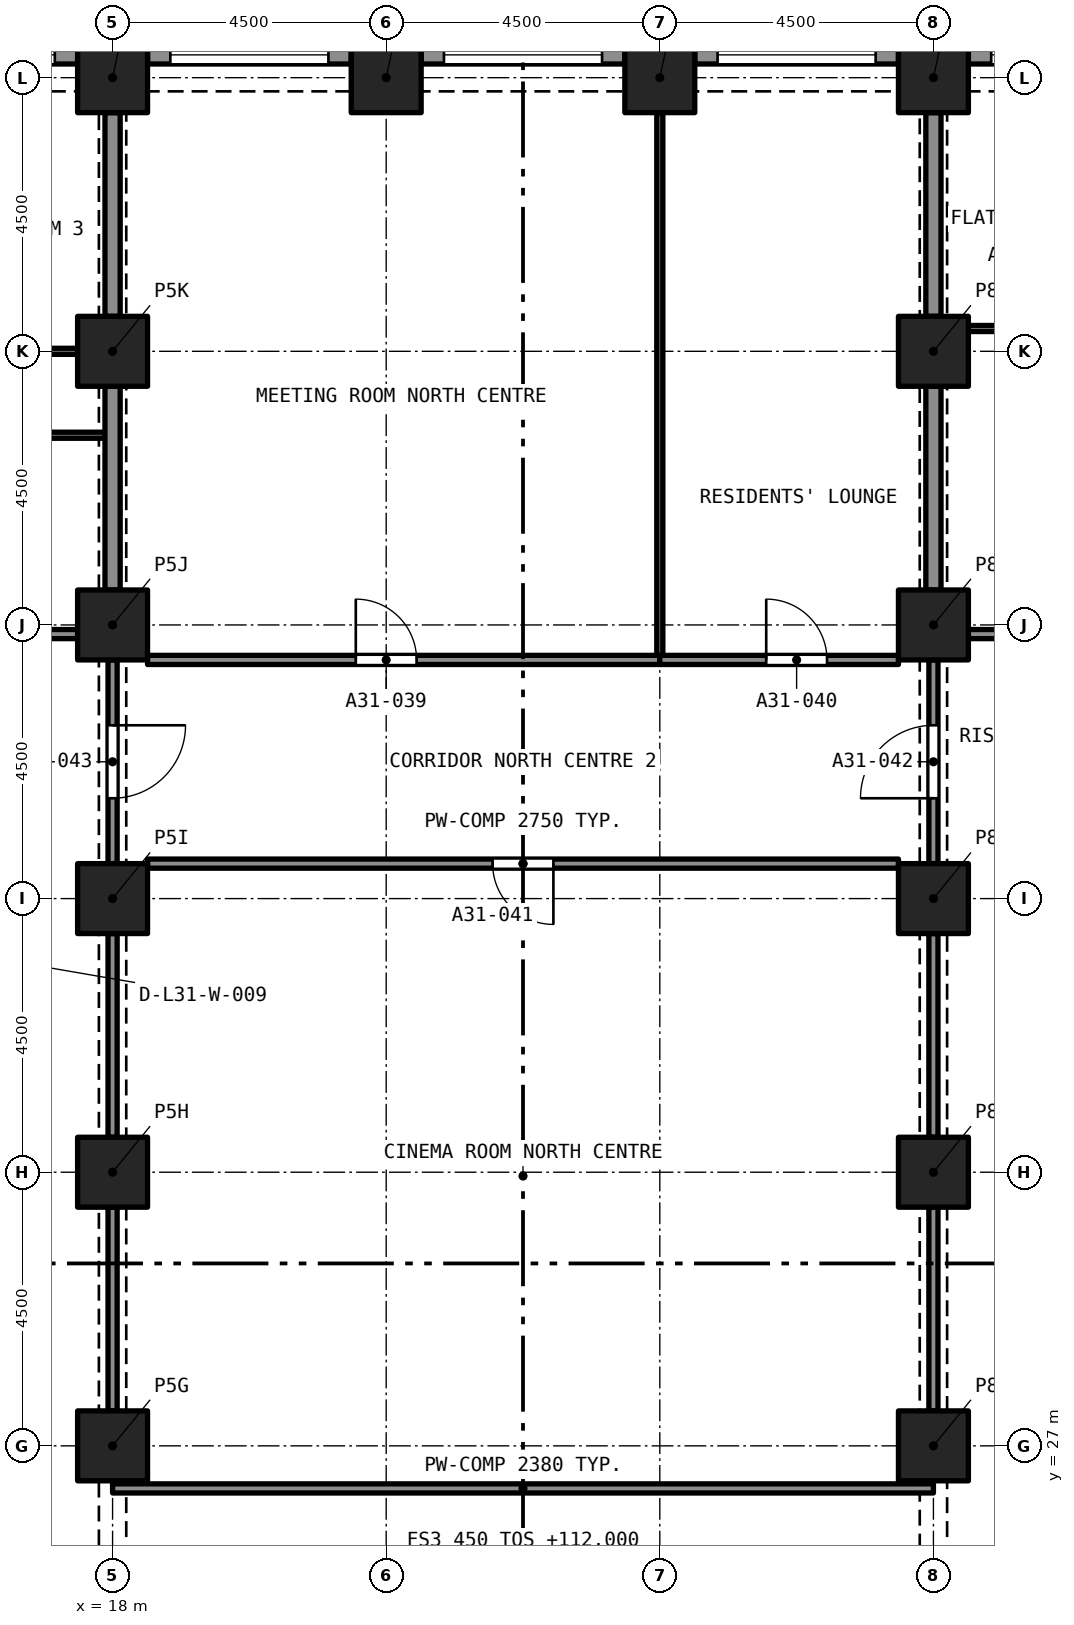
"""IFC4 building model, lengths in metres.
Left out: names, types, materials, properties, quantities, classifications, styles, units other than length and angle.
Written with IfcOpenShell. Run it as: python <this file> out.ifc"""

import sys

from ifc_helpers import new_model, si_unit, direction, frame, frame_2d, origin, origin_2d, place, context, subcontext, project, spatial, rectangle, extrude, element, fill, save


model = new_model("IFC4")
c1 = context("Model", 3, precision=1e-05, world=origin(), true_north=direction((0.0, 1.0)))
c2 = subcontext(c1, "Body", "Model", "MODEL_VIEW")
j1 = project(units=[si_unit("LENGTHUNIT", "METRE"), si_unit("PLANEANGLEUNIT", "RADIAN")], contexts=[c1])
p1 = place(None, origin())
s1 = spatial("IfcSite", under=j1, at=p1, CompositionType="ELEMENT")
p2 = place(p1, origin())
s2 = spatial("IfcBuilding", under=s1, at=p2, CompositionType="ELEMENT")
p3 = place(p2, frame((0.0, 0.0, 112.0)))
s3 = spatial("IfcBuildingStorey", under=s2, at=p3, CompositionType="ELEMENT", Elevation=112.0)
for number, where, z_axis, x_axis in (
    (1, (18.0, 27.0, 0.0), (0.0, 0.0, 1.0), (1.0, 0.0, 0.0)),
    (2, (31.5, 27.0, 0.0), (0.0, 0.0, 1.0), (1.0, 0.0, 0.0)),
    (3, (18.0, 31.5, 0.0), (0.0, 0.0, 1.0), (1.0, 0.0, 0.0)),
    (4, (31.5, 31.5, 0.0), (0.0, 0.0, 1.0), (1.0, 0.0, 0.0)),
    (5, (18.0, 36.0, 0.0), (0.0, 0.0, 1.0), (1.0, 0.0, 0.0)),
    (6, (31.5, 36.0, 0.0), (0.0, 0.0, 1.0), (1.0, 0.0, 0.0)),
    (7, (18.0, 40.5, 0.0), (0.0, 0.0, 1.0), (1.0, 0.0, 0.0)),
    (8, (31.5, 40.5, 0.0), (0.0, 0.0, 1.0), (1.0, 0.0, 0.0)),
    (9, (18.0, 45.0, 0.0), (0.0, 0.0, 1.0), (1.0, 0.0, 0.0)),
    (10, (31.5, 45.0, 0.0), (0.0, 0.0, 1.0), (1.0, 0.0, 0.0)),
    (11, (18.0, 49.5, 0.0), (0.0, 0.0, 1.0), (1.0, 0.0, 0.0)),
    (12, (22.5, 49.5, 0.0), (0.0, 0.0, 1.0), (1.0, 0.0, 0.0)),
    (13, (27.0, 49.5, 0.0), (0.0, 0.0, 1.0), (1.0, 0.0, 0.0)),
    (14, (31.5, 49.5, 0.0), (0.0, 0.0, 1.0), (1.0, 0.0, 0.0)),
):
    element("IfcColumn", number, at=place(p3, frame(where, z_axis=z_axis, x_axis=x_axis)), inside=s3, PredefinedType="COLUMN", context=c2, shape_type="SweptSolid", body=[
        extrude(rectangle(XDim=1.15, YDim=1.15, at=origin_2d()), origin(), (0.0, 0.0, 1.0), 3.2),
    ])
p4 = place(p3, frame((32.075, 49.875, 0.0), z_axis=(0.0, 0.0, 1.0), x_axis=(1.0, 0.0, 0.0)))
e15 = element("IfcWall", 15, at=p4, inside=s3, PredefinedType="SOLIDWALL", context=c2, shape_type="SweptSolid", body=[
    extrude(rectangle(XDim=3.35, YDim=0.3, at=frame_2d((1.675, 0.0))), origin(), (0.0, 0.0, 1.0), 3.2),
])
p5 = place(p4, frame((0.375, 0.0, 0.45)))
e16 = element("IfcOpeningElement", 16, at=p5, cuts=e15, PredefinedType="OPENING", context=c2, shape_type="SweptSolid", body=[
    extrude(rectangle(XDim=2.6, YDim=1.95, at=frame_2d((1.3, 0.975))), frame((0.0, 0.16, 0.0), z_axis=(0.0, -1.0, 0.0), x_axis=(1.0, 0.0, 0.0)), (0.0, 0.0, 1.0), 0.32),
])
p6 = place(p3, frame((27.575, 49.875, 0.0), z_axis=(0.0, 0.0, 1.0), x_axis=(1.0, 0.0, 0.0)))
e17 = element("IfcWall", 17, at=p6, inside=s3, PredefinedType="SOLIDWALL", context=c2, shape_type="SweptSolid", body=[
    extrude(rectangle(XDim=3.35, YDim=0.3, at=frame_2d((1.675, 0.0))), origin(), (0.0, 0.0, 1.0), 3.2),
])
p7 = place(p6, frame((0.375, 0.0, 0.45)))
e18 = element("IfcOpeningElement", 18, at=p7, cuts=e17, PredefinedType="OPENING", context=c2, shape_type="SweptSolid", body=[
    extrude(rectangle(XDim=2.6, YDim=1.95, at=frame_2d((1.3, 0.975))), frame((0.0, 0.16, 0.0), z_axis=(0.0, -1.0, 0.0), x_axis=(1.0, 0.0, 0.0)), (0.0, 0.0, 1.0), 0.32),
])
p8 = place(p3, frame((23.075, 49.875, 0.0), z_axis=(0.0, 0.0, 1.0), x_axis=(1.0, 0.0, 0.0)))
e19 = element("IfcWall", 19, at=p8, inside=s3, PredefinedType="SOLIDWALL", context=c2, shape_type="SweptSolid", body=[
    extrude(rectangle(XDim=3.35, YDim=0.3, at=frame_2d((1.675, 0.0))), origin(), (0.0, 0.0, 1.0), 3.2),
])
p9 = place(p8, frame((0.375, 0.0, 0.45)))
e20 = element("IfcOpeningElement", 20, at=p9, cuts=e19, PredefinedType="OPENING", context=c2, shape_type="SweptSolid", body=[
    extrude(rectangle(XDim=2.6, YDim=1.95, at=frame_2d((1.3, 0.975))), frame((0.0, 0.16, 0.0), z_axis=(0.0, -1.0, 0.0), x_axis=(1.0, 0.0, 0.0)), (0.0, 0.0, 1.0), 0.32),
])
p10 = place(p3, frame((18.575, 49.875, 0.0), z_axis=(0.0, 0.0, 1.0), x_axis=(1.0, 0.0, 0.0)))
e21 = element("IfcWall", 21, at=p10, inside=s3, PredefinedType="SOLIDWALL", context=c2, shape_type="SweptSolid", body=[
    extrude(rectangle(XDim=3.35, YDim=0.3, at=frame_2d((1.675, 0.0))), origin(), (0.0, 0.0, 1.0), 3.2),
])
p11 = place(p10, frame((0.375, 0.0, 0.45)))
e22 = element("IfcOpeningElement", 22, at=p11, cuts=e21, PredefinedType="OPENING", context=c2, shape_type="SweptSolid", body=[
    extrude(rectangle(XDim=2.6, YDim=1.95, at=frame_2d((1.3, 0.975))), frame((0.0, 0.16, 0.0), z_axis=(0.0, -1.0, 0.0), x_axis=(1.0, 0.0, 0.0)), (0.0, 0.0, 1.0), 0.32),
])
p12 = place(p3, frame((14.075, 49.875, 0.0), z_axis=(0.0, 0.0, 1.0), x_axis=(1.0, 0.0, 0.0)))
e23 = element("IfcWall", 23, at=p12, inside=s3, PredefinedType="SOLIDWALL", context=c2, shape_type="SweptSolid", body=[
    extrude(rectangle(XDim=3.35, YDim=0.3, at=frame_2d((1.675, 0.0))), origin(), (0.0, 0.0, 1.0), 3.2),
])
p13 = place(p12, frame((0.375, 0.0, 0.45)))
e24 = element("IfcOpeningElement", 24, at=p13, cuts=e23, PredefinedType="OPENING", context=c2, shape_type="SweptSolid", body=[
    extrude(rectangle(XDim=2.6, YDim=1.95, at=frame_2d((1.3, 0.975))), frame((0.0, 0.16, 0.0), z_axis=(0.0, -1.0, 0.0), x_axis=(1.0, 0.0, 0.0)), (0.0, 0.0, 1.0), 0.32),
])
p14 = place(p3, frame((13.5, 45.0, 0.0), z_axis=(0.0, 0.0, 1.0), x_axis=(1.0, 0.0, 0.0)))
e25 = element("IfcWall", 25, at=p14, inside=s3, PredefinedType="PARTITIONING", context=c2, shape_type="SweptSolid", body=[
    extrude(rectangle(XDim=3.925, YDim=0.1, at=frame_2d((1.962, 0.0))), origin(), (0.0, 0.0, 1.0), 2.9),
])
p15 = place(p14, frame((1.8, 0.0, 0.0)))
e26 = element("IfcOpeningElement", 26, at=p15, cuts=e25, PredefinedType="OPENING", context=c2, shape_type="SweptSolid", body=[
    extrude(rectangle(XDim=0.9, YDim=2.1, at=frame_2d((0.45, 1.05))), frame((0.0, 0.06, 0.0), z_axis=(0.0, -1.0, 0.0), x_axis=(1.0, 0.0, 0.0)), (0.0, 0.0, 1.0), 0.12),
])
p16 = place(p3, frame((18.0, 45.575, 0.0), z_axis=(0.0, 0.0, 1.0), x_axis=(0.0, 1.0, 0.0)))
e27 = element("IfcWall", 27, at=p16, inside=s3, PredefinedType="PARTITIONING", context=c2, shape_type="SweptSolid", body=[
    extrude(rectangle(XDim=3.35, YDim=0.25, at=frame_2d((1.675, 0.0))), origin(), (0.0, 0.0, 1.0), 2.38),
])
p17 = place(p3, frame((17.875, 43.62, 0.0), z_axis=(0.0, 0.0, 1.0), x_axis=(-1.0, 0.0, 0.0)))
e28 = element("IfcWall", 28, at=p17, inside=s3, PredefinedType="PARTITIONING", context=c2, shape_type="SweptSolid", body=[
    extrude(rectangle(XDim=6.064, YDim=0.1, at=frame_2d((3.032, 0.0))), origin(), (0.0, 0.0, 1.0), 2.9),
])
p18 = place(p17, frame((2.52, 0.0, 0.0)))
e29 = element("IfcOpeningElement", 29, at=p18, cuts=e28, PredefinedType="OPENING", context=c2, shape_type="SweptSolid", body=[
    extrude(rectangle(XDim=0.9, YDim=2.1, at=frame_2d((0.45, 1.05))), frame((0.0, 0.06, 0.0), z_axis=(0.0, -1.0, 0.0), x_axis=(1.0, 0.0, 0.0)), (0.0, 0.0, 1.0), 0.12),
])
p19 = place(p3, frame((18.0, 41.075, 0.0), z_axis=(0.0, 0.0, 1.0), x_axis=(0.0, 1.0, 0.0)))
e30 = element("IfcWall", 30, at=p19, inside=s3, PredefinedType="PARTITIONING", context=c2, shape_type="SweptSolid", body=[
    extrude(rectangle(XDim=3.35, YDim=0.25, at=frame_2d((1.675, 0.0))), origin(), (0.0, 0.0, 1.0), 2.38),
])
p20 = place(p3, frame((13.35, 40.35, 0.0), z_axis=(0.0, 0.0, 1.0), x_axis=(1.0, 0.0, 0.0)))
e31 = element("IfcWall", 31, at=p20, inside=s3, PredefinedType="PARTITIONING", context=c2, shape_type="SweptSolid", body=[
    extrude(rectangle(XDim=4.075, YDim=0.15, at=frame_2d((2.038, 0.0))), origin(), (0.0, 0.0, 1.0), 2.9),
])
p21 = place(p3, frame((32.075, 45.375, 0.0), z_axis=(0.0, 0.0, 1.0), x_axis=(1.0, 0.0, 0.0)))
e32 = element("IfcWall", 32, at=p21, inside=s3, PredefinedType="PARTITIONING", context=c2, shape_type="SweptSolid", body=[
    extrude(rectangle(XDim=3.925, YDim=0.1, at=frame_2d((1.962, 0.0))), origin(), (0.0, 0.0, 1.0), 2.9),
])
p22 = place(p21, frame((1.175, 0.0, 0.0)))
e33 = element("IfcOpeningElement", 33, at=p22, cuts=e32, PredefinedType="OPENING", context=c2, shape_type="SweptSolid", body=[
    extrude(rectangle(XDim=1.0, YDim=2.1, at=frame_2d((0.5, 1.05))), frame((0.0, 0.06, 0.0), z_axis=(0.0, -1.0, 0.0), x_axis=(1.0, 0.0, 0.0)), (0.0, 0.0, 1.0), 0.12),
])
p23 = place(p3, frame((31.5, 41.075, 0.0), z_axis=(0.0, 0.0, 1.0), x_axis=(0.0, 1.0, 0.0)))
e34 = element("IfcWall", 34, at=p23, inside=s3, PredefinedType="PARTITIONING", context=c2, shape_type="SweptSolid", body=[
    extrude(rectangle(XDim=3.35, YDim=0.25, at=frame_2d((1.675, 0.0))), origin(), (0.0, 0.0, 1.0), 2.38),
])
p24 = place(p3, frame((32.075, 40.35, 0.0), z_axis=(0.0, 0.0, 1.0), x_axis=(1.0, 0.0, 0.0)))
e35 = element("IfcWall", 35, at=p24, inside=s3, PredefinedType="PARTITIONING", context=c2, shape_type="SweptSolid", body=[
    extrude(rectangle(XDim=2.425, YDim=0.15, at=frame_2d((1.212, 0.0))), origin(), (0.0, 0.0, 1.0), 2.9),
])
p25 = place(p24, frame((1.175, 0.0, 0.0)))
e36 = element("IfcOpeningElement", 36, at=p25, cuts=e35, PredefinedType="OPENING", context=c2, shape_type="SweptSolid", body=[
    extrude(rectangle(XDim=1.0, YDim=2.1, at=frame_2d((0.5, 1.05))), frame((0.0, 0.085, 0.0), z_axis=(0.0, -1.0, 0.0), x_axis=(1.0, 0.0, 0.0)), (0.0, 0.0, 1.0), 0.17),
])
p26 = place(p3, frame((31.5, 45.575, 0.0), z_axis=(0.0, 0.0, 1.0), x_axis=(0.0, 1.0, 0.0)))
e37 = element("IfcWall", 37, at=p26, inside=s3, PredefinedType="PARTITIONING", context=c2, shape_type="SweptSolid", body=[
    extrude(rectangle(XDim=3.35, YDim=0.25, at=frame_2d((1.675, 0.0))), origin(), (0.0, 0.0, 1.0), 2.38),
])
p27 = place(p3, frame((18.575, 39.925, 0.0), z_axis=(0.0, 0.0, 1.0), x_axis=(1.0, 0.0, 0.0)))
e38 = element("IfcWall", 38, at=p27, inside=s3, PredefinedType="PARTITIONING", context=c2, shape_type="SweptSolid", body=[
    extrude(rectangle(XDim=8.425, YDim=0.15, at=frame_2d((4.212, 0.0))), origin(), (0.0, 0.0, 1.0), 2.75),
])
p28 = place(p27, frame((3.425, 0.0, 0.0)))
e39 = element("IfcOpeningElement", 39, at=p28, cuts=e38, PredefinedType="OPENING", context=c2, shape_type="SweptSolid", body=[
    extrude(rectangle(XDim=1.0, YDim=2.1, at=frame_2d((0.5, 1.05))), frame((0.0, 0.085, 0.0), z_axis=(0.0, -1.0, 0.0), x_axis=(1.0, 0.0, 0.0)), (0.0, 0.0, 1.0), 0.17),
])
p29 = place(p3, frame((27.0, 39.925, 0.0), z_axis=(0.0, 0.0, 1.0), x_axis=(1.0, 0.0, 0.0)))
e40 = element("IfcWall", 40, at=p29, inside=s3, PredefinedType="PARTITIONING", context=c2, shape_type="SweptSolid", body=[
    extrude(rectangle(XDim=3.925, YDim=0.15, at=frame_2d((1.962, 0.0))), origin(), (0.0, 0.0, 1.0), 2.75),
])
p30 = place(p29, frame((1.75, 0.0, 0.0)))
e41 = element("IfcOpeningElement", 41, at=p30, cuts=e40, PredefinedType="OPENING", context=c2, shape_type="SweptSolid", body=[
    extrude(rectangle(XDim=1.0, YDim=2.1, at=frame_2d((0.5, 1.05))), frame((0.0, 0.085, 0.0), z_axis=(0.0, -1.0, 0.0), x_axis=(1.0, 0.0, 0.0)), (0.0, 0.0, 1.0), 0.17),
])
p31 = place(p3, frame((30.925, 36.575, 0.0), z_axis=(0.0, 0.0, 1.0), x_axis=(-1.0, 0.0, 0.0)))
e42 = element("IfcWall", 42, at=p31, inside=s3, PredefinedType="PARTITIONING", context=c2, shape_type="SweptSolid", body=[
    extrude(rectangle(XDim=12.35, YDim=0.15, at=frame_2d((6.175, 0.0))), origin(), (0.0, 0.0, 1.0), 2.75),
])
p32 = place(p31, frame((5.675, 0.0, 0.0)))
e43 = element("IfcOpeningElement", 43, at=p32, cuts=e42, PredefinedType="OPENING", context=c2, shape_type="SweptSolid", body=[
    extrude(rectangle(XDim=1.0, YDim=2.1, at=frame_2d((0.5, 1.05))), frame((0.0, 0.085, 0.0), z_axis=(0.0, -1.0, 0.0), x_axis=(1.0, 0.0, 0.0)), (0.0, 0.0, 1.0), 0.17),
])
p33 = place(p3, frame((31.5, 36.575, 0.0), z_axis=(0.0, 0.0, 1.0), x_axis=(0.0, 1.0, 0.0)))
e44 = element("IfcWall", 44, at=p33, inside=s3, PredefinedType="PARTITIONING", context=c2, shape_type="SweptSolid", body=[
    extrude(rectangle(XDim=3.35, YDim=0.15, at=frame_2d((1.675, 0.0))), origin(), (0.0, 0.0, 1.0), 2.38),
])
p34 = place(p33, frame((1.075, 0.0, 0.0)))
e45 = element("IfcOpeningElement", 45, at=p34, cuts=e44, PredefinedType="OPENING", context=c2, shape_type="SweptSolid", body=[
    extrude(rectangle(XDim=1.2, YDim=2.1, at=frame_2d((0.6, 1.05))), frame((0.0, 0.085, 0.0), z_axis=(0.0, -1.0, 0.0), x_axis=(1.0, 0.0, 0.0)), (0.0, 0.0, 1.0), 0.17),
])
p35 = place(p3, frame((18.0, 39.925, 0.0), z_axis=(0.0, 0.0, 1.0), x_axis=(0.0, -1.0, 0.0)))
e46 = element("IfcWall", 46, at=p35, inside=s3, PredefinedType="PARTITIONING", context=c2, shape_type="SweptSolid", body=[
    extrude(rectangle(XDim=3.35, YDim=0.15, at=frame_2d((1.675, 0.0))), origin(), (0.0, 0.0, 1.0), 2.38),
])
p36 = place(p35, frame((1.075, 0.0, 0.0)))
e47 = element("IfcOpeningElement", 47, at=p36, cuts=e46, PredefinedType="OPENING", context=c2, shape_type="SweptSolid", body=[
    extrude(rectangle(XDim=1.2, YDim=2.1, at=frame_2d((0.6, 1.05))), frame((0.0, 0.085, 0.0), z_axis=(0.0, -1.0, 0.0), x_axis=(1.0, 0.0, 0.0)), (0.0, 0.0, 1.0), 0.17),
])
p37 = place(p3, frame((27.0, 40.0, 0.0), z_axis=(0.0, 0.0, 1.0), x_axis=(0.0, 1.0, 0.0)))
e48 = element("IfcWall", 48, at=p37, inside=s3, PredefinedType="PARTITIONING", context=c2, shape_type="SweptSolid", body=[
    extrude(rectangle(XDim=8.925, YDim=0.1, at=frame_2d((4.462, 0.0))), origin(), (0.0, 0.0, 1.0), 2.75),
])
for number, where, z_axis, x_axis in (
    (49, (31.5, 32.075, 0.0), (0.0, 0.0, 1.0), (0.0, 1.0, 0.0)),
    (50, (31.5, 27.575, 0.0), (0.0, 0.0, 1.0), (0.0, 1.0, 0.0)),
    (51, (18.0, 27.575, 0.0), (0.0, 0.0, 1.0), (0.0, 1.0, 0.0)),
    (52, (18.0, 32.075, 0.0), (0.0, 0.0, 1.0), (0.0, 1.0, 0.0)),
):
    element("IfcWall", number, at=place(p3, frame(where, z_axis=z_axis, x_axis=x_axis)), inside=s3, PredefinedType="PARTITIONING", context=c2, shape_type="SweptSolid", body=[
        extrude(rectangle(XDim=3.35, YDim=0.15, at=frame_2d((1.675, 0.0))), origin(), (0.0, 0.0, 1.0), 2.38),
    ])
p38 = place(p3, frame((18.0, 26.3, 0.0), z_axis=(0.0, 0.0, 1.0), x_axis=(1.0, 0.0, 0.0)))
e53 = element("IfcWall", 53, at=p38, inside=s3, PredefinedType="PARTITIONING", context=c2, shape_type="SweptSolid", body=[
    extrude(rectangle(XDim=13.5, YDim=0.15, at=frame_2d((6.75, 0.0))), origin(), (0.0, 0.0, 1.0), 2.38),
])
p39 = place(p5, origin())
e54 = element("IfcWindow", 54, at=p39, inside=s3, PartitioningType="SINGLE_PANEL", PredefinedType="WINDOW", context=c2, shape_type="SweptSolid", body=[
    extrude(rectangle(XDim=2.6, YDim=1.95, at=frame_2d((1.3, 0.975))), frame((0.0, 0.03, 0.0), z_axis=(0.0, -1.0, 0.0), x_axis=(1.0, 0.0, 0.0)), (0.0, 0.0, 1.0), 0.06),
])
fill(e16, e54)
p40 = place(p7, origin())
e55 = element("IfcWindow", 55, at=p40, inside=s3, PartitioningType="SINGLE_PANEL", PredefinedType="WINDOW", context=c2, shape_type="SweptSolid", body=[
    extrude(rectangle(XDim=2.6, YDim=1.95, at=frame_2d((1.3, 0.975))), frame((0.0, 0.03, 0.0), z_axis=(0.0, -1.0, 0.0), x_axis=(1.0, 0.0, 0.0)), (0.0, 0.0, 1.0), 0.06),
])
fill(e18, e55)
p41 = place(p9, origin())
e56 = element("IfcWindow", 56, at=p41, inside=s3, PartitioningType="SINGLE_PANEL", PredefinedType="WINDOW", context=c2, shape_type="SweptSolid", body=[
    extrude(rectangle(XDim=2.6, YDim=1.95, at=frame_2d((1.3, 0.975))), frame((0.0, 0.03, 0.0), z_axis=(0.0, -1.0, 0.0), x_axis=(1.0, 0.0, 0.0)), (0.0, 0.0, 1.0), 0.06),
])
fill(e20, e56)
p42 = place(p11, origin())
e57 = element("IfcWindow", 57, at=p42, inside=s3, PartitioningType="SINGLE_PANEL", PredefinedType="WINDOW", context=c2, shape_type="SweptSolid", body=[
    extrude(rectangle(XDim=2.6, YDim=1.95, at=frame_2d((1.3, 0.975))), frame((0.0, 0.03, 0.0), z_axis=(0.0, -1.0, 0.0), x_axis=(1.0, 0.0, 0.0)), (0.0, 0.0, 1.0), 0.06),
])
fill(e22, e57)
p43 = place(p13, origin())
e58 = element("IfcWindow", 58, at=p43, inside=s3, PartitioningType="SINGLE_PANEL", PredefinedType="WINDOW", context=c2, shape_type="SweptSolid", body=[
    extrude(rectangle(XDim=2.6, YDim=1.95, at=frame_2d((1.3, 0.975))), frame((0.0, 0.03, 0.0), z_axis=(0.0, -1.0, 0.0), x_axis=(1.0, 0.0, 0.0)), (0.0, 0.0, 1.0), 0.06),
])
fill(e24, e58)
p44 = place(p28, origin())
e59 = element("IfcDoor", 59, at=p44, inside=s3, OperationType="SINGLE_SWING_LEFT", PredefinedType="DOOR", context=c2, shape_type="SweptSolid", body=[
    extrude(rectangle(XDim=1.0, YDim=2.1, at=frame_2d((0.5, 1.05))), frame((0.0, 0.025, 0.0), z_axis=(0.0, -1.0, 0.0), x_axis=(1.0, 0.0, 0.0)), (0.0, 0.0, 1.0), 0.05),
])
fill(e39, e59)
p45 = place(p30, origin())
e60 = element("IfcDoor", 60, at=p45, inside=s3, OperationType="SINGLE_SWING_RIGHT", PredefinedType="DOOR", context=c2, shape_type="SweptSolid", body=[
    extrude(rectangle(XDim=1.0, YDim=2.1, at=frame_2d((0.5, 1.05))), frame((0.0, 0.025, 0.0), z_axis=(0.0, -1.0, 0.0), x_axis=(1.0, 0.0, 0.0)), (0.0, 0.0, 1.0), 0.05),
])
fill(e41, e60)
p46 = place(p32, origin())
e61 = element("IfcDoor", 61, at=p46, inside=s3, OperationType="SINGLE_SWING_RIGHT", PredefinedType="DOOR", context=c2, shape_type="SweptSolid", body=[
    extrude(rectangle(XDim=1.0, YDim=2.1, at=frame_2d((0.5, 1.05))), frame((0.0, 0.025, 0.0), z_axis=(0.0, -1.0, 0.0), x_axis=(1.0, 0.0, 0.0)), (0.0, 0.0, 1.0), 0.05),
])
fill(e43, e61)
p47 = place(p34, origin())
e62 = element("IfcDoor", 62, at=p47, inside=s3, OperationType="SINGLE_SWING_LEFT", PredefinedType="DOOR", context=c2, shape_type="SweptSolid", body=[
    extrude(rectangle(XDim=1.2, YDim=2.1, at=frame_2d((0.6, 1.05))), frame((0.0, 0.025, 0.0), z_axis=(0.0, -1.0, 0.0), x_axis=(1.0, 0.0, 0.0)), (0.0, 0.0, 1.0), 0.05),
])
fill(e45, e62)
p48 = place(p36, origin())
e63 = element("IfcDoor", 63, at=p48, inside=s3, OperationType="SINGLE_SWING_LEFT", PredefinedType="DOOR", context=c2, shape_type="SweptSolid", body=[
    extrude(rectangle(XDim=1.2, YDim=2.1, at=frame_2d((0.6, 1.05))), frame((0.0, 0.025, 0.0), z_axis=(0.0, -1.0, 0.0), x_axis=(1.0, 0.0, 0.0)), (0.0, 0.0, 1.0), 0.05),
])
fill(e47, e63)
save(model, sys.argv[1])
